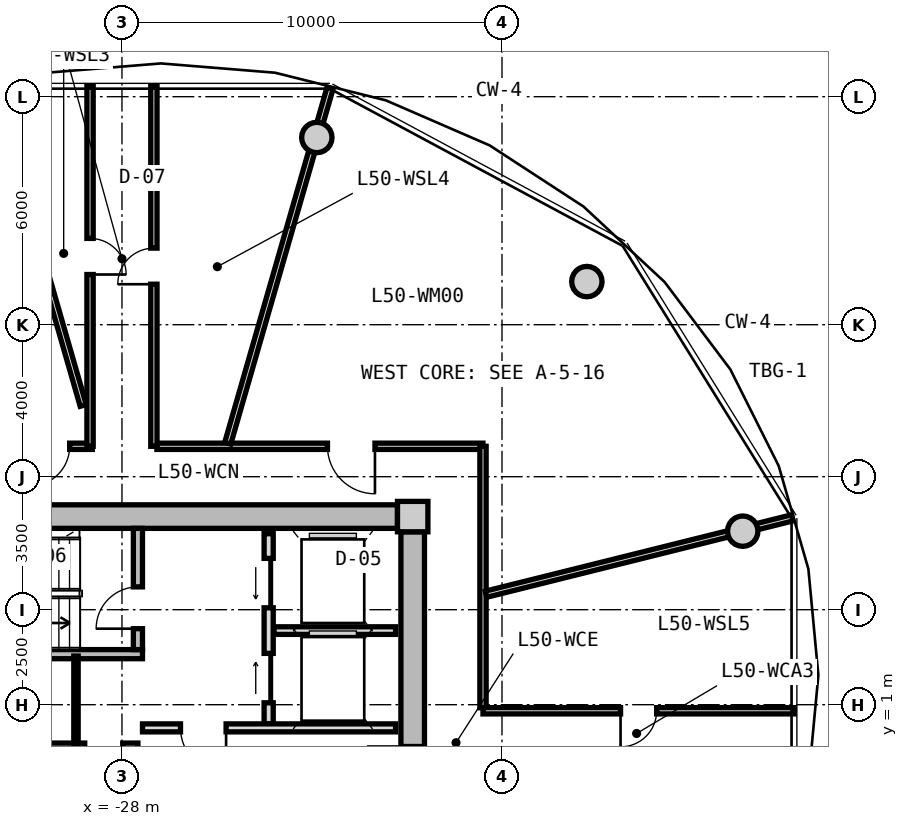
"""IFC4 building model, lengths in metres.
Left out: names, types, materials, properties, quantities, classifications, styles, units other than length and angle.
Written with IfcOpenShell. Run it as: python <this file> out.ifc"""

import sys

from ifc_helpers import new_model, si_unit, direction, frame, frame_2d, origin, origin_2d, place, context, subcontext, project, spatial, rectangle, circle, extrude, source, transform, mapped, element, fill, save


model = new_model("IFC4")
c1 = context("Model", 3, precision=1e-05, world=origin(), true_north=direction((0.0, 1.0)))
c2 = subcontext(c1, "Body", "Model", "MODEL_VIEW")
j1 = project(units=[si_unit("LENGTHUNIT", "METRE"), si_unit("PLANEANGLEUNIT", "RADIAN")], contexts=[c1])
p1 = place(None, origin())
s1 = spatial("IfcSite", under=j1, at=p1, CompositionType="ELEMENT")
p2 = place(p1, origin())
s2 = spatial("IfcBuilding", under=s1, at=p2, CompositionType="ELEMENT")
p3 = place(p2, frame((0.0, 0.0, 161.75)))
s3 = spatial("IfcBuildingStorey", under=s2, at=p3, CompositionType="ELEMENT", Elevation=161.75)
m1 = source(origin(), c2, "Body", "SweptSolid", [
    extrude(rectangle(XDim=0.8, YDim=0.8, at=origin_2d()), origin(), (0.0, 0.0, 1.0), 3.05),
])
p4 = place(p3, frame((-20.35, 5.95, 0.0), z_axis=(0.0, 0.0, 1.0), x_axis=(1.0, 0.0, 0.0)))
e1 = element("IfcColumn", 1, at=p4, inside=s3, PredefinedType="COLUMN", context=c2, shape_type="MappedRepresentation", body=[
    mapped(m1, transform((0.0, 0.0, 0.0), x_axis=(1.0, 0.0, 0.0), y_axis=(0.0, 1.0, 0.0), z_axis=(0.0, 0.0, 1.0), scale=1.0)),
])
m2 = source(origin(), c2, "Body", "SweptSolid", [
    extrude(rectangle(XDim=14.5, YDim=0.62, at=frame_2d((7.25, 0.0))), origin(), (0.0, 0.0, 1.0), 2.81),
])
p5 = place(p3, frame((-35.25, 5.95, 0.0), z_axis=(0.0, 0.0, 1.0), x_axis=(1.0, 0.0, 0.0)))
e2 = element("IfcWall", 2, at=p5, inside=s3, PredefinedType="SHEAR", context=c2, shape_type="MappedRepresentation", body=[
    mapped(m2, transform((0.0, 0.0, 0.0), x_axis=(1.0, 0.0, 0.0), y_axis=(0.0, 1.0, 0.0), z_axis=(0.0, 0.0, 1.0), scale=1.0)),
])
m3 = source(origin(), c2, "Body", "SweptSolid", [
    extrude(rectangle(XDim=11.1, YDim=0.62, at=frame_2d((5.55, 0.0))), origin(), (0.0, 0.0, 1.0), 2.81),
])
p6 = place(p3, frame((-20.35, 5.55, 0.0), z_axis=(0.0, 0.0, 1.0), x_axis=(0.0, -1.0, 0.0)))
e3 = element("IfcWall", 3, at=p6, inside=s3, PredefinedType="SHEAR", context=c2, shape_type="MappedRepresentation", body=[
    mapped(m3, transform((0.0, 0.0, 0.0), x_axis=(1.0, 0.0, 0.0), y_axis=(0.0, 1.0, 0.0), z_axis=(0.0, 0.0, 1.0), scale=1.0)),
])
p7 = place(p6, frame((5.65, 0.0, 0.0)))
e4 = element("IfcOpeningElement", 4, at=p7, cuts=e3, PredefinedType="OPENING", context=c2, shape_type="SweptSolid", body=[
    extrude(rectangle(XDim=1.2, YDim=2.15, at=frame_2d((0.6, 1.075))), frame((0.0, 0.32, 0.0), z_axis=(0.0, -1.0, 0.0), x_axis=(1.0, 0.0, 0.0)), (0.0, 0.0, 1.0), 0.64),
])
m4 = source(origin(), c2, "Body", "SweptSolid", [
    extrude(circle(Radius=0.4, at=origin_2d()), origin(), (0.0, 0.0, 1.0), 3.05),
])
for number, where, z_axis, x_axis in (
    (5, (-11.665, 5.567, 0.0), (0.0, 0.0, 1.0), (1.0, 0.0, 0.0)),
    (6, (-15.767, 12.135, 0.0), (0.0, 0.0, 1.0), (1.0, 0.0, 0.0)),
    (7, (-22.873, 15.926, 0.0), (0.0, 0.0, 1.0), (1.0, 0.0, 0.0)),
):
    element("IfcColumn", number, at=place(p3, frame(where, z_axis=z_axis, x_axis=x_axis)), inside=s3, PredefinedType="COLUMN", context=c2, shape_type="MappedRepresentation", body=[
        mapped(m4, transform((0.0, 0.0, 0.0), x_axis=(1.0, 0.0, 0.0), y_axis=(0.0, 1.0, 0.0), z_axis=(0.0, 0.0, 1.0), scale=1.0)),
    ])
m5 = source(origin(), c2, "Body", "SweptSolid", [
    extrude(rectangle(XDim=7.88, YDim=0.24, at=frame_2d((3.94, 0.0))), origin(), (0.0, 0.0, 1.0), 2.81),
])
p8 = place(p3, frame((-35.34, 2.33, 0.0), z_axis=(0.0, 0.0, 1.0), x_axis=(1.0, 0.0, 0.0)))
e8 = element("IfcWall", 8, at=p8, inside=s3, PredefinedType="PARTITIONING", context=c2, shape_type="MappedRepresentation", body=[
    mapped(m5, transform((0.0, 0.0, 0.0), x_axis=(1.0, 0.0, 0.0), y_axis=(0.0, 1.0, 0.0), z_axis=(0.0, 0.0, 1.0), scale=1.0)),
])
m6 = source(origin(), c2, "Body", "SweptSolid", [
    extrude(rectangle(XDim=3.19, YDim=0.24, at=frame_2d((1.595, 0.0))), origin(), (0.0, 0.0, 1.0), 2.81),
])
p9 = place(p3, frame((-27.58, 2.45, 0.0), z_axis=(0.0, 0.0, 1.0), x_axis=(0.0, 1.0, 0.0)))
e9 = element("IfcWall", 9, at=p9, inside=s3, PredefinedType="PARTITIONING", context=c2, shape_type="MappedRepresentation", body=[
    mapped(m6, transform((0.0, 0.0, 0.0), x_axis=(1.0, 0.0, 0.0), y_axis=(0.0, 1.0, 0.0), z_axis=(0.0, 0.0, 1.0), scale=1.0)),
])
p10 = place(p9, frame((0.55, 0.0, 0.0)))
e10 = element("IfcOpeningElement", 10, at=p10, cuts=e9, PredefinedType="OPENING", context=c2, shape_type="SweptSolid", body=[
    extrude(rectangle(XDim=1.1, YDim=2.15, at=frame_2d((0.55, 1.075))), frame((0.0, 0.13, 0.0), z_axis=(0.0, -1.0, 0.0), x_axis=(1.0, 0.0, 0.0)), (0.0, 0.0, 1.0), 0.26),
])
m7 = source(origin(), c2, "Body", "SweptSolid", [
    extrude(rectangle(XDim=5.0, YDim=0.24, at=frame_2d((2.5, 0.0))), origin(), (0.0, 0.0, 1.0), 2.795),
])
p11 = place(p3, frame((-24.14, 0.5, 0.0), z_axis=(0.0, 0.0, 1.0), x_axis=(0.0, 1.0, 0.0)))
e11 = element("IfcWall", 11, at=p11, inside=s3, PredefinedType="PARTITIONING", context=c2, shape_type="MappedRepresentation", body=[
    mapped(m7, transform((0.0, 0.0, 0.0), x_axis=(1.0, 0.0, 0.0), y_axis=(0.0, 1.0, 0.0), z_axis=(0.0, 0.0, 1.0), scale=1.0)),
])
p12 = place(p11, frame((3.05, 0.0, 0.0)))
e12 = element("IfcOpeningElement", 12, at=p12, cuts=e11, PredefinedType="OPENING", context=c2, shape_type="SweptSolid", body=[
    extrude(rectangle(XDim=1.3, YDim=2.2, at=frame_2d((0.65, 1.1))), frame((0.0, 0.13, 0.0), z_axis=(0.0, -1.0, 0.0), x_axis=(1.0, 0.0, 0.0)), (0.0, 0.0, 1.0), 0.26),
])
p13 = place(p11, frame((0.55, 0.0, 0.0)))
e13 = element("IfcOpeningElement", 13, at=p13, cuts=e11, PredefinedType="OPENING", context=c2, shape_type="SweptSolid", body=[
    extrude(rectangle(XDim=1.3, YDim=2.2, at=frame_2d((0.65, 1.1))), frame((0.0, 0.13, 0.0), z_axis=(0.0, -1.0, 0.0), x_axis=(1.0, 0.0, 0.0)), (0.0, 0.0, 1.0), 0.26),
])
m8 = source(origin(), c2, "Body", "SweptSolid", [
    extrude(rectangle(XDim=3.2, YDim=0.2, at=frame_2d((1.6, 0.0))), origin(), (0.0, 0.0, 1.0), 2.795),
])
p14 = place(p3, frame((-24.0, 2.95, 0.0), z_axis=(0.0, 0.0, 1.0), x_axis=(1.0, 0.0, 0.0)))
e14 = element("IfcWall", 14, at=p14, inside=s3, PredefinedType="PARTITIONING", context=c2, shape_type="MappedRepresentation", body=[
    mapped(m8, transform((0.0, 0.0, 0.0), x_axis=(1.0, 0.0, 0.0), y_axis=(0.0, 1.0, 0.0), z_axis=(0.0, 0.0, 1.0), scale=1.0)),
])
m9 = source(origin(), c2, "Body", "SweptSolid", [
    extrude(rectangle(XDim=6.66, YDim=0.21, at=frame_2d((3.33, 0.0))), origin(), (0.0, 0.0, 1.0), 2.795),
])
p15 = place(p3, frame((-27.46, 0.39, 0.0), z_axis=(0.0, 0.0, 1.0), x_axis=(1.0, 0.0, 0.0)))
e15 = element("IfcWall", 15, at=p15, inside=s3, PredefinedType="PARTITIONING", context=c2, shape_type="MappedRepresentation", body=[
    mapped(m9, transform((0.0, 0.0, 0.0), x_axis=(1.0, 0.0, 0.0), y_axis=(0.0, 1.0, 0.0), z_axis=(0.0, 0.0, 1.0), scale=1.0)),
])
p16 = place(p15, frame((1.0, 0.0, 0.0)))
e16 = element("IfcOpeningElement", 16, at=p16, cuts=e15, PredefinedType="OPENING", context=c2, shape_type="SweptSolid", body=[
    extrude(rectangle(XDim=1.2, YDim=2.15, at=frame_2d((0.6, 1.075))), frame((0.0, 0.115, 0.0), z_axis=(0.0, -1.0, 0.0), x_axis=(1.0, 0.0, 0.0)), (0.0, 0.0, 1.0), 0.23),
])
m10 = source(origin(), c2, "Body", "SweptSolid", [
    extrude(rectangle(XDim=7.62, YDim=0.24, at=frame_2d((3.81, 0.0))), origin(), (0.0, 0.0, 1.0), 2.795),
])
p17 = place(p3, frame((-35.2, -0.13, 0.0), z_axis=(0.0, 0.0, 1.0), x_axis=(1.0, 0.0, 0.0)))
e17 = element("IfcWall", 17, at=p17, inside=s3, PredefinedType="PARTITIONING", context=c2, shape_type="MappedRepresentation", body=[
    mapped(m10, transform((0.0, 0.0, 0.0), x_axis=(1.0, 0.0, 0.0), y_axis=(0.0, 1.0, 0.0), z_axis=(0.0, 0.0, 1.0), scale=1.0)),
])
p18 = place(p17, frame((6.22, 0.0, 0.0)))
e18 = element("IfcOpeningElement", 18, at=p18, cuts=e17, PredefinedType="OPENING", context=c2, shape_type="SweptSolid", body=[
    extrude(rectangle(XDim=1.0, YDim=2.1, at=frame_2d((0.5, 1.05))), frame((0.0, 0.13, 0.0), z_axis=(0.0, -1.0, 0.0), x_axis=(1.0, 0.0, 0.0)), (0.0, 0.0, 1.0), 0.26),
])
p19 = place(p17, frame((2.4, 0.0, 0.0)))
e19 = element("IfcOpeningElement", 19, at=p19, cuts=e17, PredefinedType="OPENING", context=c2, shape_type="SweptSolid", body=[
    extrude(rectangle(XDim=1.0, YDim=2.1, at=frame_2d((0.5, 1.05))), frame((0.0, 0.13, 0.0), z_axis=(0.0, -1.0, 0.0), x_axis=(1.0, 0.0, 0.0)), (0.0, 0.0, 1.0), 0.26),
])
m11 = source(origin(), c2, "Body", "SweptSolid", [
    extrude(rectangle(XDim=2.33, YDim=0.115, at=frame_2d((1.165, 0.0))), origin(), (0.0, 0.0, 1.0), 2.795),
])
p20 = place(p3, frame((-29.21, -0.05, 0.0), z_axis=(0.0, 0.0, 1.0), x_axis=(0.0, 1.0, 0.0)))
e20 = element("IfcWall", 20, at=p20, inside=s3, PredefinedType="PARTITIONING", context=c2, shape_type="MappedRepresentation", body=[
    mapped(m11, transform((0.0, 0.0, 0.0), x_axis=(1.0, 0.0, 0.0), y_axis=(0.0, 1.0, 0.0), z_axis=(0.0, 0.0, 1.0), scale=1.0)),
])
m12 = source(origin(), c2, "Body", "SweptSolid", [
    extrude(rectangle(XDim=8.719, YDim=0.165, at=frame_2d((4.36, 0.0))), origin(), (0.0, 0.0, 1.0), 2.795),
])
p21 = place(p3, frame((-37.5, 7.8, 0.0), z_axis=(0.0, 0.0, 1.0), x_axis=(1.0, 0.0, 0.0)))
e21 = element("IfcWall", 21, at=p21, inside=s3, PredefinedType="PARTITIONING", context=c2, shape_type="MappedRepresentation", body=[
    mapped(m12, transform((0.0, 0.0, 0.0), x_axis=(1.0, 0.0, 0.0), y_axis=(0.0, 1.0, 0.0), z_axis=(0.0, 0.0, 1.0), scale=1.0)),
])
p22 = place(p21, frame((7.073, 0.0, 0.0)))
e22 = element("IfcOpeningElement", 22, at=p22, cuts=e21, PredefinedType="OPENING", context=c2, shape_type="SweptSolid", body=[
    extrude(rectangle(XDim=1.05, YDim=2.15, at=frame_2d((0.525, 1.075))), frame((0.0, 0.093, 0.0), z_axis=(0.0, -1.0, 0.0), x_axis=(1.0, 0.0, 0.0)), (0.0, 0.0, 1.0), 0.185),
])
p23 = place(p21, frame((4.785, 0.0, 0.0)))
e23 = element("IfcOpeningElement", 23, at=p23, cuts=e21, PredefinedType="OPENING", context=c2, shape_type="SweptSolid", body=[
    extrude(rectangle(XDim=1.05, YDim=2.15, at=frame_2d((0.525, 1.075))), frame((0.0, 0.093, 0.0), z_axis=(0.0, -1.0, 0.0), x_axis=(1.0, 0.0, 0.0)), (0.0, 0.0, 1.0), 0.185),
])
p24 = place(p21, frame((2.028, 0.0, 0.0)))
e24 = element("IfcOpeningElement", 24, at=p24, cuts=e21, PredefinedType="OPENING", context=c2, shape_type="SweptSolid", body=[
    extrude(rectangle(XDim=0.92, YDim=2.1, at=frame_2d((0.46, 1.05))), frame((0.0, 0.093, 0.0), z_axis=(0.0, -1.0, 0.0), x_axis=(1.0, 0.0, 0.0)), (0.0, 0.0, 1.0), 0.185),
])
m13 = source(origin(), c2, "Body", "SweptSolid", [
    extrude(rectangle(XDim=8.58, YDim=0.165, at=frame_2d((4.29, 0.0))), origin(), (0.0, 0.0, 1.0), 2.795),
])
p25 = place(p3, frame((-27.08, 7.8, 0.0), z_axis=(0.0, 0.0, 1.0), x_axis=(1.0, 0.0, 0.0)))
e25 = element("IfcWall", 25, at=p25, inside=s3, PredefinedType="PARTITIONING", context=c2, shape_type="MappedRepresentation", body=[
    mapped(m13, transform((0.0, 0.0, 0.0), x_axis=(1.0, 0.0, 0.0), y_axis=(0.0, 1.0, 0.0), z_axis=(0.0, 0.0, 1.0), scale=1.0)),
])
p26 = place(p25, frame((4.487, 0.0, 0.0)))
e26 = element("IfcOpeningElement", 26, at=p26, cuts=e25, PredefinedType="OPENING", context=c2, shape_type="SweptSolid", body=[
    extrude(rectangle(XDim=1.25, YDim=2.2, at=frame_2d((0.625, 1.1))), frame((0.0, 0.093, 0.0), z_axis=(0.0, -1.0, 0.0), x_axis=(1.0, 0.0, 0.0)), (0.0, 0.0, 1.0), 0.185),
])
m14 = source(origin(), c2, "Body", "SweptSolid", [
    extrude(rectangle(XDim=6.88, YDim=0.165, at=frame_2d((3.44, 0.0))), origin(), (0.0, 0.0, 1.0), 2.795),
])
p27 = place(p3, frame((-18.5, 7.8, 0.0), z_axis=(0.0, 0.0, 1.0), x_axis=(0.0, -1.0, 0.0)))
e27 = element("IfcWall", 27, at=p27, inside=s3, PredefinedType="PARTITIONING", context=c2, shape_type="MappedRepresentation", body=[
    mapped(m14, transform((0.0, 0.0, 0.0), x_axis=(1.0, 0.0, 0.0), y_axis=(0.0, 1.0, 0.0), z_axis=(0.0, 0.0, 1.0), scale=1.0)),
])
m15 = source(origin(), c2, "Body", "SweptSolid", [
    extrude(rectangle(XDim=9.73, YDim=0.165, at=frame_2d((4.865, 0.0))), origin(), (0.0, 0.0, 1.0), 2.345),
])
p28 = place(p3, frame((-25.217, 7.88, 0.0), z_axis=(0.0, 0.0, 1.0), x_axis=(0.27679492614, 0.960929013436, 0.0)))
e28 = element("IfcWall", 28, at=p28, inside=s3, PredefinedType="PARTITIONING", context=c2, shape_type="MappedRepresentation", body=[
    mapped(m15, transform((0.0, 0.0, 0.0), x_axis=(1.0, 0.0, 0.0), y_axis=(0.0, 1.0, 0.0), z_axis=(0.0, 0.0, 1.0), scale=1.0)),
])
m16 = source(origin(), c2, "Body", "SweptSolid", [
    extrude(rectangle(XDim=8.695, YDim=0.165, at=frame_2d((4.348, 0.0))), origin(), (0.0, 0.0, 1.0), 2.345),
])
p29 = place(p3, frame((-29.02, 8.875, 0.0), z_axis=(0.0, 0.0, 1.0), x_axis=(-0.276797231892, 0.960928349263, 0.0)))
e29 = element("IfcWall", 29, at=p29, inside=s3, PredefinedType="PARTITIONING", context=c2, shape_type="MappedRepresentation", body=[
    mapped(m16, transform((0.0, 0.0, 0.0), x_axis=(1.0, 0.0, 0.0), y_axis=(0.0, 1.0, 0.0), z_axis=(0.0, 0.0, 1.0), scale=1.0)),
])
m17 = source(origin(), c2, "Body", "SweptSolid", [
    extrude(rectangle(XDim=8.305, YDim=0.165, at=frame_2d((4.153, 0.0))), origin(), (0.0, 0.0, 1.0), 2.345),
])
p30 = place(p3, frame((-18.42, 3.908, 0.0), z_axis=(0.0, 0.0, 1.0), x_axis=(0.970309994378, 0.241864662175, 0.0)))
e30 = element("IfcWall", 30, at=p30, inside=s3, PredefinedType="PARTITIONING", context=c2, shape_type="MappedRepresentation", body=[
    mapped(m17, transform((0.0, 0.0, 0.0), x_axis=(1.0, 0.0, 0.0), y_axis=(0.0, 1.0, 0.0), z_axis=(0.0, 0.0, 1.0), scale=1.0)),
])
m18 = source(origin(), c2, "Body", "SweptSolid", [
    extrude(rectangle(XDim=9.48, YDim=0.165, at=frame_2d((4.74, 0.0))), origin(), (0.0, 0.0, 1.0), 2.795),
])
p31 = place(p3, frame((-28.84, 7.8, 0.0), z_axis=(0.0, 0.0, 1.0), x_axis=(0.0, 1.0, 0.0)))
e31 = element("IfcWall", 31, at=p31, inside=s3, PredefinedType="PARTITIONING", context=c2, shape_type="MappedRepresentation", body=[
    mapped(m18, transform((0.0, 0.0, 0.0), x_axis=(1.0, 0.0, 0.0), y_axis=(0.0, 1.0, 0.0), z_axis=(0.0, 0.0, 1.0), scale=1.0)),
])
p32 = place(p31, frame((4.521, 0.0, 0.0)))
e32 = element("IfcOpeningElement", 32, at=p32, cuts=e31, PredefinedType="OPENING", context=c2, shape_type="SweptSolid", body=[
    extrude(rectangle(XDim=0.95, YDim=2.1, at=frame_2d((0.475, 1.05))), frame((0.0, 0.093, 0.0), z_axis=(0.0, -1.0, 0.0), x_axis=(1.0, 0.0, 0.0)), (0.0, 0.0, 1.0), 0.185),
])
p33 = place(p3, frame((-27.16, 17.28, 0.0), z_axis=(0.0, 0.0, 1.0), x_axis=(0.0, -1.0, 0.0)))
e33 = element("IfcWall", 33, at=p33, inside=s3, PredefinedType="PARTITIONING", context=c2, shape_type="MappedRepresentation", body=[
    mapped(m18, transform((0.0, 0.0, 0.0), x_axis=(1.0, 0.0, 0.0), y_axis=(0.0, 1.0, 0.0), z_axis=(0.0, 0.0, 1.0), scale=1.0)),
])
p34 = place(p33, frame((4.265, 0.0, 0.0)))
e34 = element("IfcOpeningElement", 34, at=p34, cuts=e33, PredefinedType="OPENING", context=c2, shape_type="SweptSolid", body=[
    extrude(rectangle(XDim=0.95, YDim=2.1, at=frame_2d((0.475, 1.05))), frame((0.0, 0.093, 0.0), z_axis=(0.0, -1.0, 0.0), x_axis=(1.0, 0.0, 0.0)), (0.0, 0.0, 1.0), 0.185),
])
m19 = source(origin(), c2, "Body", "SweptSolid", [
    extrude(rectangle(XDim=8.189, YDim=0.165, at=frame_2d((4.094, 0.0))), origin(), (0.0, 0.0, 1.0), 2.795),
])
p35 = place(p3, frame((-18.5, 0.84, 0.0), z_axis=(0.0, 0.0, 1.0), x_axis=(1.0, 0.0, 0.0)))
e35 = element("IfcWall", 35, at=p35, inside=s3, PredefinedType="PARTITIONING", context=c2, shape_type="MappedRepresentation", body=[
    mapped(m19, transform((0.0, 0.0, 0.0), x_axis=(1.0, 0.0, 0.0), y_axis=(0.0, 1.0, 0.0), z_axis=(0.0, 0.0, 1.0), scale=1.0)),
])
p36 = place(p35, frame((3.619, 0.0, 0.0)))
e36 = element("IfcOpeningElement", 36, at=p36, cuts=e35, PredefinedType="OPENING", context=c2, shape_type="SweptSolid", body=[
    extrude(rectangle(XDim=0.95, YDim=2.1, at=frame_2d((0.475, 1.05))), frame((0.0, 0.093, 0.0), z_axis=(0.0, -1.0, 0.0), x_axis=(1.0, 0.0, 0.0)), (0.0, 0.0, 1.0), 0.185),
])
m20 = source(origin(), c2, "Body", "SweptSolid", [
    extrude(rectangle(XDim=1.1, YDim=2.15, at=frame_2d((0.55, 1.075))), frame((0.0, 0.025, 0.0), z_axis=(0.0, -1.0, 0.0), x_axis=(1.0, 0.0, 0.0)), (0.0, 0.0, 1.0), 0.05),
])
p37 = place(p10, origin())
e37 = element("IfcDoor", 37, at=p37, inside=s3, OperationType="SINGLE_SWING_LEFT", PredefinedType="DOOR", context=c2, shape_type="MappedRepresentation", body=[
    mapped(m20, transform((0.0, 0.0, 0.0), x_axis=(1.0, 0.0, 0.0), y_axis=(0.0, 1.0, 0.0), z_axis=(0.0, 0.0, 1.0), scale=1.0)),
])
fill(e10, e37)
m21 = source(origin(), c2, "Body", "SweptSolid", [
    extrude(rectangle(XDim=1.3, YDim=2.2, at=frame_2d((0.65, 1.1))), frame((0.0, 0.025, 0.0), z_axis=(0.0, -1.0, 0.0), x_axis=(1.0, 0.0, 0.0)), (0.0, 0.0, 1.0), 0.05),
])
p38 = place(p12, origin())
e38 = element("IfcDoor", 38, at=p38, inside=s3, OperationType="SLIDING_TO_LEFT", PredefinedType="DOOR", context=c2, shape_type="MappedRepresentation", body=[
    mapped(m21, transform((0.0, 0.0, 0.0), x_axis=(1.0, 0.0, 0.0), y_axis=(0.0, 1.0, 0.0), z_axis=(0.0, 0.0, 1.0), scale=1.0)),
])
fill(e12, e38)
p39 = place(p13, origin())
e39 = element("IfcDoor", 39, at=p39, inside=s3, OperationType="SLIDING_TO_RIGHT", PredefinedType="DOOR", context=c2, shape_type="MappedRepresentation", body=[
    mapped(m21, transform((0.0, 0.0, 0.0), x_axis=(1.0, 0.0, 0.0), y_axis=(0.0, 1.0, 0.0), z_axis=(0.0, 0.0, 1.0), scale=1.0)),
])
fill(e13, e39)
m22 = source(origin(), c2, "Body", "SweptSolid", [
    extrude(rectangle(XDim=1.2, YDim=2.15, at=frame_2d((0.6, 1.075))), frame((0.0, 0.025, 0.0), z_axis=(0.0, -1.0, 0.0), x_axis=(1.0, 0.0, 0.0)), (0.0, 0.0, 1.0), 0.05),
])
p40 = place(p16, frame((1.2, 0.0, 0.0), z_axis=(0.0, 0.0, 1.0), x_axis=(-1.0, 0.0, 0.0)))
e40 = element("IfcDoor", 40, at=p40, inside=s3, OperationType="SINGLE_SWING_LEFT", PredefinedType="DOOR", context=c2, shape_type="MappedRepresentation", body=[
    mapped(m22, transform((0.0, 0.0, 0.0), x_axis=(1.0, 0.0, 0.0), y_axis=(0.0, 1.0, 0.0), z_axis=(0.0, 0.0, 1.0), scale=1.0)),
])
fill(e16, e40)
m23 = source(origin(), c2, "Body", "SweptSolid", [
    extrude(rectangle(XDim=0.95, YDim=2.1, at=frame_2d((0.475, 1.05))), frame((0.0, 0.025, 0.0), z_axis=(0.0, -1.0, 0.0), x_axis=(1.0, 0.0, 0.0)), (0.0, 0.0, 1.0), 0.05),
])
p41 = place(p32, frame((0.95, 0.0, 0.0), z_axis=(0.0, 0.0, 1.0), x_axis=(-1.0, 0.0, 0.0)))
e41 = element("IfcDoor", 41, at=p41, inside=s3, OperationType="SINGLE_SWING_RIGHT", PredefinedType="DOOR", context=c2, shape_type="MappedRepresentation", body=[
    mapped(m23, transform((0.0, 0.0, 0.0), x_axis=(1.0, 0.0, 0.0), y_axis=(0.0, 1.0, 0.0), z_axis=(0.0, 0.0, 1.0), scale=1.0)),
])
fill(e32, e41)
p42 = place(p34, frame((0.95, 0.0, 0.0), z_axis=(0.0, 0.0, 1.0), x_axis=(-1.0, 0.0, 0.0)))
e42 = element("IfcDoor", 42, at=p42, inside=s3, OperationType="SINGLE_SWING_LEFT", PredefinedType="DOOR", context=c2, shape_type="MappedRepresentation", body=[
    mapped(m23, transform((0.0, 0.0, 0.0), x_axis=(1.0, 0.0, 0.0), y_axis=(0.0, 1.0, 0.0), z_axis=(0.0, 0.0, 1.0), scale=1.0)),
])
fill(e34, e42)
p43 = place(p36, frame((0.95, 0.0, 0.0), z_axis=(0.0, 0.0, 1.0), x_axis=(-1.0, 0.0, 0.0)))
e43 = element("IfcDoor", 43, at=p43, inside=s3, OperationType="SINGLE_SWING_RIGHT", PredefinedType="DOOR", context=c2, shape_type="MappedRepresentation", body=[
    mapped(m23, transform((0.0, 0.0, 0.0), x_axis=(1.0, 0.0, 0.0), y_axis=(0.0, 1.0, 0.0), z_axis=(0.0, 0.0, 1.0), scale=1.0)),
])
fill(e36, e43)
m24 = source(origin(), c2, "Body", "SweptSolid", [
    extrude(rectangle(XDim=1.25, YDim=2.2, at=frame_2d((0.625, 1.1))), frame((0.0, 0.025, 0.0), z_axis=(0.0, -1.0, 0.0), x_axis=(1.0, 0.0, 0.0)), (0.0, 0.0, 1.0), 0.05),
])
p44 = place(p26, frame((1.25, 0.0, 0.0), z_axis=(0.0, 0.0, 1.0), x_axis=(-1.0, 0.0, 0.0)))
e44 = element("IfcDoor", 44, at=p44, inside=s3, OperationType="SINGLE_SWING_LEFT", PredefinedType="DOOR", context=c2, shape_type="MappedRepresentation", body=[
    mapped(m24, transform((0.0, 0.0, 0.0), x_axis=(1.0, 0.0, 0.0), y_axis=(0.0, 1.0, 0.0), z_axis=(0.0, 0.0, 1.0), scale=1.0)),
])
fill(e26, e44)
m25 = source(origin(), c2, "Body", "SweptSolid", [
    extrude(rectangle(XDim=1.05, YDim=2.15, at=frame_2d((0.525, 1.075))), frame((0.0, 0.025, 0.0), z_axis=(0.0, -1.0, 0.0), x_axis=(1.0, 0.0, 0.0)), (0.0, 0.0, 1.0), 0.05),
])
p45 = place(p22, frame((1.05, 0.0, 0.0), z_axis=(0.0, 0.0, 1.0), x_axis=(-1.0, 0.0, 0.0)))
e45 = element("IfcDoor", 45, at=p45, inside=s3, OperationType="SINGLE_SWING_RIGHT", PredefinedType="DOOR", context=c2, shape_type="MappedRepresentation", body=[
    mapped(m25, transform((0.0, 0.0, 0.0), x_axis=(1.0, 0.0, 0.0), y_axis=(0.0, 1.0, 0.0), z_axis=(0.0, 0.0, 1.0), scale=1.0)),
])
fill(e22, e45)
save(model, sys.argv[1])
